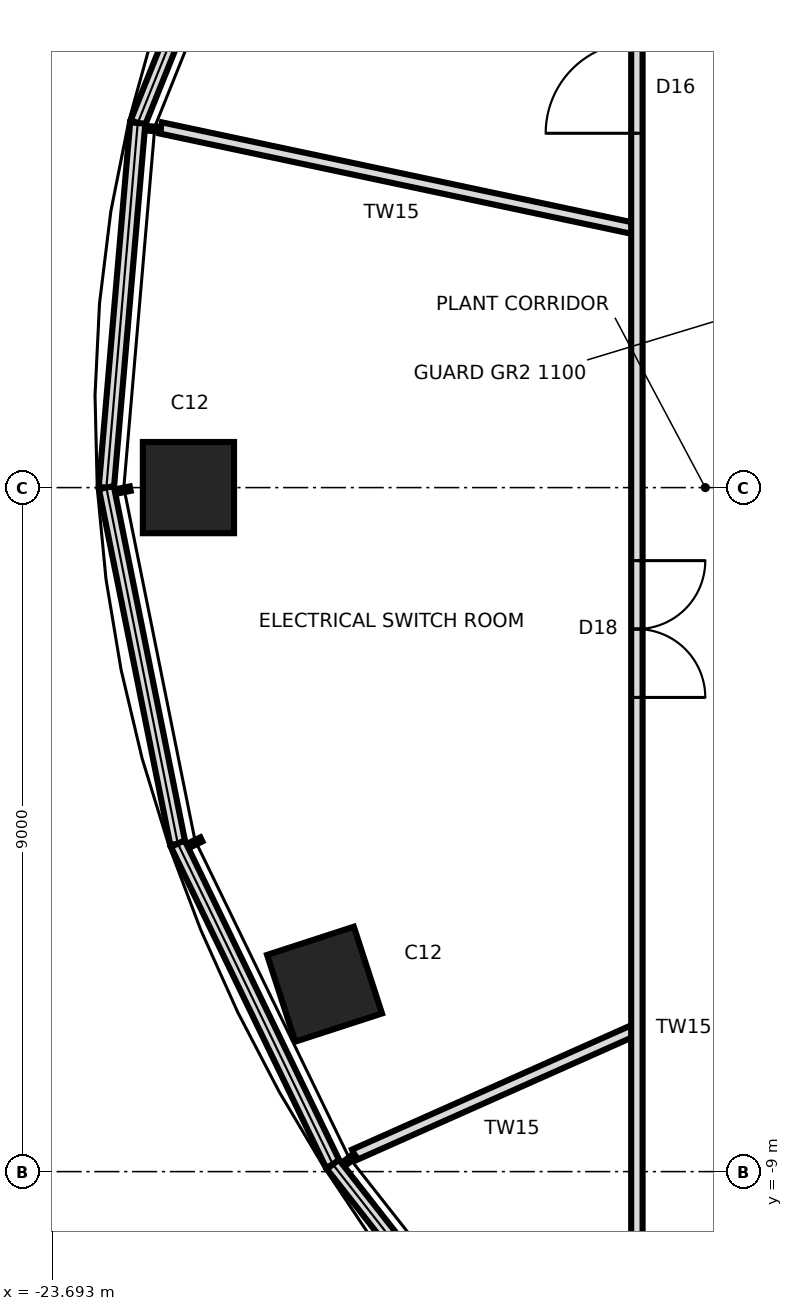
"""IFC4 building model, lengths in metres.
Left out: names, types, materials, properties, quantities, classifications, styles, units other than length and angle.
Written with IfcOpenShell. Run it as: python <this file> out.ifc"""

import sys

from ifc_helpers import new_model, si_unit, direction, frame, frame_2d, origin, origin_2d, place, context, subcontext, project, spatial, rectangle, extrude, element, fill, save


model = new_model("IFC4")
c1 = context("Model", 3, precision=1e-05, world=origin(), true_north=direction((0.0, 1.0)))
c2 = subcontext(c1, "Body", "Model", "MODEL_VIEW")
j1 = project(units=[si_unit("LENGTHUNIT", "METRE"), si_unit("PLANEANGLEUNIT", "RADIAN")], contexts=[c1])
p1 = place(None, origin())
s1 = spatial("IfcSite", under=j1, at=p1, CompositionType="ELEMENT")
p2 = place(p1, origin())
s2 = spatial("IfcBuilding", under=s1, at=p2, CompositionType="ELEMENT")
p3 = place(p2, frame((0.0, 0.0, 277.0)))
s3 = spatial("IfcBuildingStorey", under=s2, at=p3, CompositionType="ELEMENT", Elevation=277.0)
for number, where, z_axis, x_axis in (
    (1, (-21.9, 0.0, 0.0), (0.0, 0.0, 1.0), (-1.0, 0.0, 0.0)),
    (2, (-20.109, -6.534, 0.0), (0.0, 0.0, 1.0), (-0.951, -0.309, 0.0)),
):
    element("IfcColumn", number, at=place(p3, frame(where, z_axis=z_axis, x_axis=x_axis)), inside=s3, PredefinedType="COLUMN", context=c2, shape_type="SweptSolid", body=[
        extrude(rectangle(XDim=1.2, YDim=1.2, at=origin_2d()), origin(), (0.0, 0.0, 1.0), 5.0),
    ])
p4 = place(p3, frame((-20.78, 9.252, 5.0), z_axis=(0.0, 0.0, 1.0), x_axis=(-0.372363873994, -0.928086819939, 0.0)))
e3 = element("IfcWall", 3, at=p4, inside=s3, PredefinedType="PARAPET", context=c2, shape_type="SweptSolid", body=[
    extrude(rectangle(XDim=4.8, YDim=0.2, at=frame_2d((2.4, 0.0))), origin(), (0.0, 0.0, 1.0), 0.4),
])
p5 = place(p3, frame((-22.567, 4.797, 5.0), z_axis=(0.0, 0.0, 1.0), x_axis=(-0.085747752545, -0.996316878776, 0.0)))
e4 = element("IfcWall", 4, at=p5, inside=s3, PredefinedType="PARAPET", context=c2, shape_type="SweptSolid", body=[
    extrude(rectangle(XDim=4.815, YDim=0.2, at=frame_2d((2.407, 0.0))), origin(), (0.0, 0.0, 1.0), 0.4),
])
p6 = place(p3, frame((-22.98, 0.0, 5.0), z_axis=(0.0, 0.0, 1.0), x_axis=(0.196715481336, -0.980460615937, 0.0)))
e5 = element("IfcWall", 5, at=p6, inside=s3, PredefinedType="PARAPET", context=c2, shape_type="SweptSolid", body=[
    extrude(rectangle(XDim=4.778, YDim=0.2, at=frame_2d((2.389, 0.0))), origin(), (0.0, 0.0, 1.0), 0.4),
])
p7 = place(p3, frame((-22.04, -4.685, 5.0), z_axis=(0.0, 0.0, 1.0), x_axis=(0.43525592316, -0.900306770692, 0.0)))
e6 = element("IfcWall", 6, at=p7, inside=s3, PredefinedType="PARAPET", context=c2, shape_type="SweptSolid", body=[
    extrude(rectangle(XDim=4.687, YDim=0.2, at=frame_2d((2.344, 0.0))), origin(), (0.0, 0.0, 1.0), 0.4),
])
p8 = place(p3, frame((-20.0, -8.905, 5.0), z_axis=(0.0, 0.0, 1.0), x_axis=(0.617115858167, -0.786872300694, 0.0)))
e7 = element("IfcWall", 7, at=p8, inside=s3, PredefinedType="PARAPET", context=c2, shape_type="SweptSolid", body=[
    extrude(rectangle(XDim=4.555, YDim=0.2, at=frame_2d((2.277, 0.0))), origin(), (0.0, 0.0, 1.0), 0.4),
])
p9 = place(p3, frame((-16.0, -7.124, 0.0), z_axis=(0.0, 0.0, 1.0), x_axis=(-0.91357135451, -0.406678472774, 0.0)))
e8 = element("IfcWall", 8, at=p9, inside=s3, PredefinedType="PARTITIONING", context=c2, shape_type="SweptSolid", body=[
    extrude(rectangle(XDim=4.068, YDim=0.15, at=frame_2d((2.034, 0.0))), origin(), (0.0, 0.0, 1.0), 4.75),
])
p10 = place(p3, frame((-16.0, 3.401, 0.0), z_axis=(0.0, 0.0, 1.0), x_axis=(-0.97814421791, 0.207927605117, 0.0)))
e9 = element("IfcWall", 9, at=p10, inside=s3, PredefinedType="PARTITIONING", context=c2, shape_type="SweptSolid", body=[
    extrude(rectangle(XDim=6.404, YDim=0.15, at=frame_2d((3.202, 0.0))), origin(), (0.0, 0.0, 1.0), 4.75),
])
p11 = place(p3, frame((-16.0, 11.3, 0.0), z_axis=(0.0, 0.0, 1.0), x_axis=(0.0, -1.0, 0.0)))
e10 = element("IfcWall", 10, at=p11, inside=s3, PredefinedType="PARTITIONING", context=c2, shape_type="SweptSolid", body=[
    extrude(rectangle(XDim=22.6, YDim=0.15, at=frame_2d((11.3, 0.0))), origin(), (0.0, 0.0, 1.0), 4.75),
])
p12 = place(p11, frame((5.438, 0.0, 0.0)))
e11 = element("IfcOpeningElement", 11, at=p12, cuts=e10, PredefinedType="OPENING", context=c2, shape_type="SweptSolid", body=[
    extrude(rectangle(XDim=1.2, YDim=2.1, at=frame_2d((0.6, 1.05))), frame((0.0, 0.085, 0.0), z_axis=(0.0, -1.0, 0.0), x_axis=(1.0, 0.0, 0.0)), (0.0, 0.0, 1.0), 0.17),
])
p13 = place(p11, frame((12.261, 0.0, 0.0)))
e12 = element("IfcOpeningElement", 12, at=p13, cuts=e10, PredefinedType="OPENING", context=c2, shape_type="SweptSolid", body=[
    extrude(rectangle(XDim=1.8, YDim=2.4, at=frame_2d((0.9, 1.2))), frame((0.0, 0.085, 0.0), z_axis=(0.0, -1.0, 0.0), x_axis=(1.0, 0.0, 0.0)), (0.0, 0.0, 1.0), 0.17),
])
p14 = place(p12, frame((1.2, 0.0, 0.0), z_axis=(0.0, 0.0, 1.0), x_axis=(-1.0, 0.0, 0.0)))
e13 = element("IfcDoor", 13, at=p14, inside=s3, OperationType="SINGLE_SWING_LEFT", PredefinedType="DOOR", context=c2, shape_type="SweptSolid", body=[
    extrude(rectangle(XDim=1.2, YDim=2.1, at=frame_2d((0.6, 1.05))), frame((0.0, 0.025, 0.0), z_axis=(0.0, -1.0, 0.0), x_axis=(1.0, 0.0, 0.0)), (0.0, 0.0, 1.0), 0.05),
])
fill(e11, e13)
p15 = place(p13, origin())
e14 = element("IfcDoor", 14, at=p15, inside=s3, OperationType="DOUBLE_DOOR_SINGLE_SWING", PredefinedType="DOOR", context=c2, shape_type="SweptSolid", body=[
    extrude(rectangle(XDim=1.8, YDim=2.4, at=frame_2d((0.9, 1.2))), frame((0.0, 0.025, 0.0), z_axis=(0.0, -1.0, 0.0), x_axis=(1.0, 0.0, 0.0)), (0.0, 0.0, 1.0), 0.05),
])
fill(e12, e14)
save(model, sys.argv[1])
